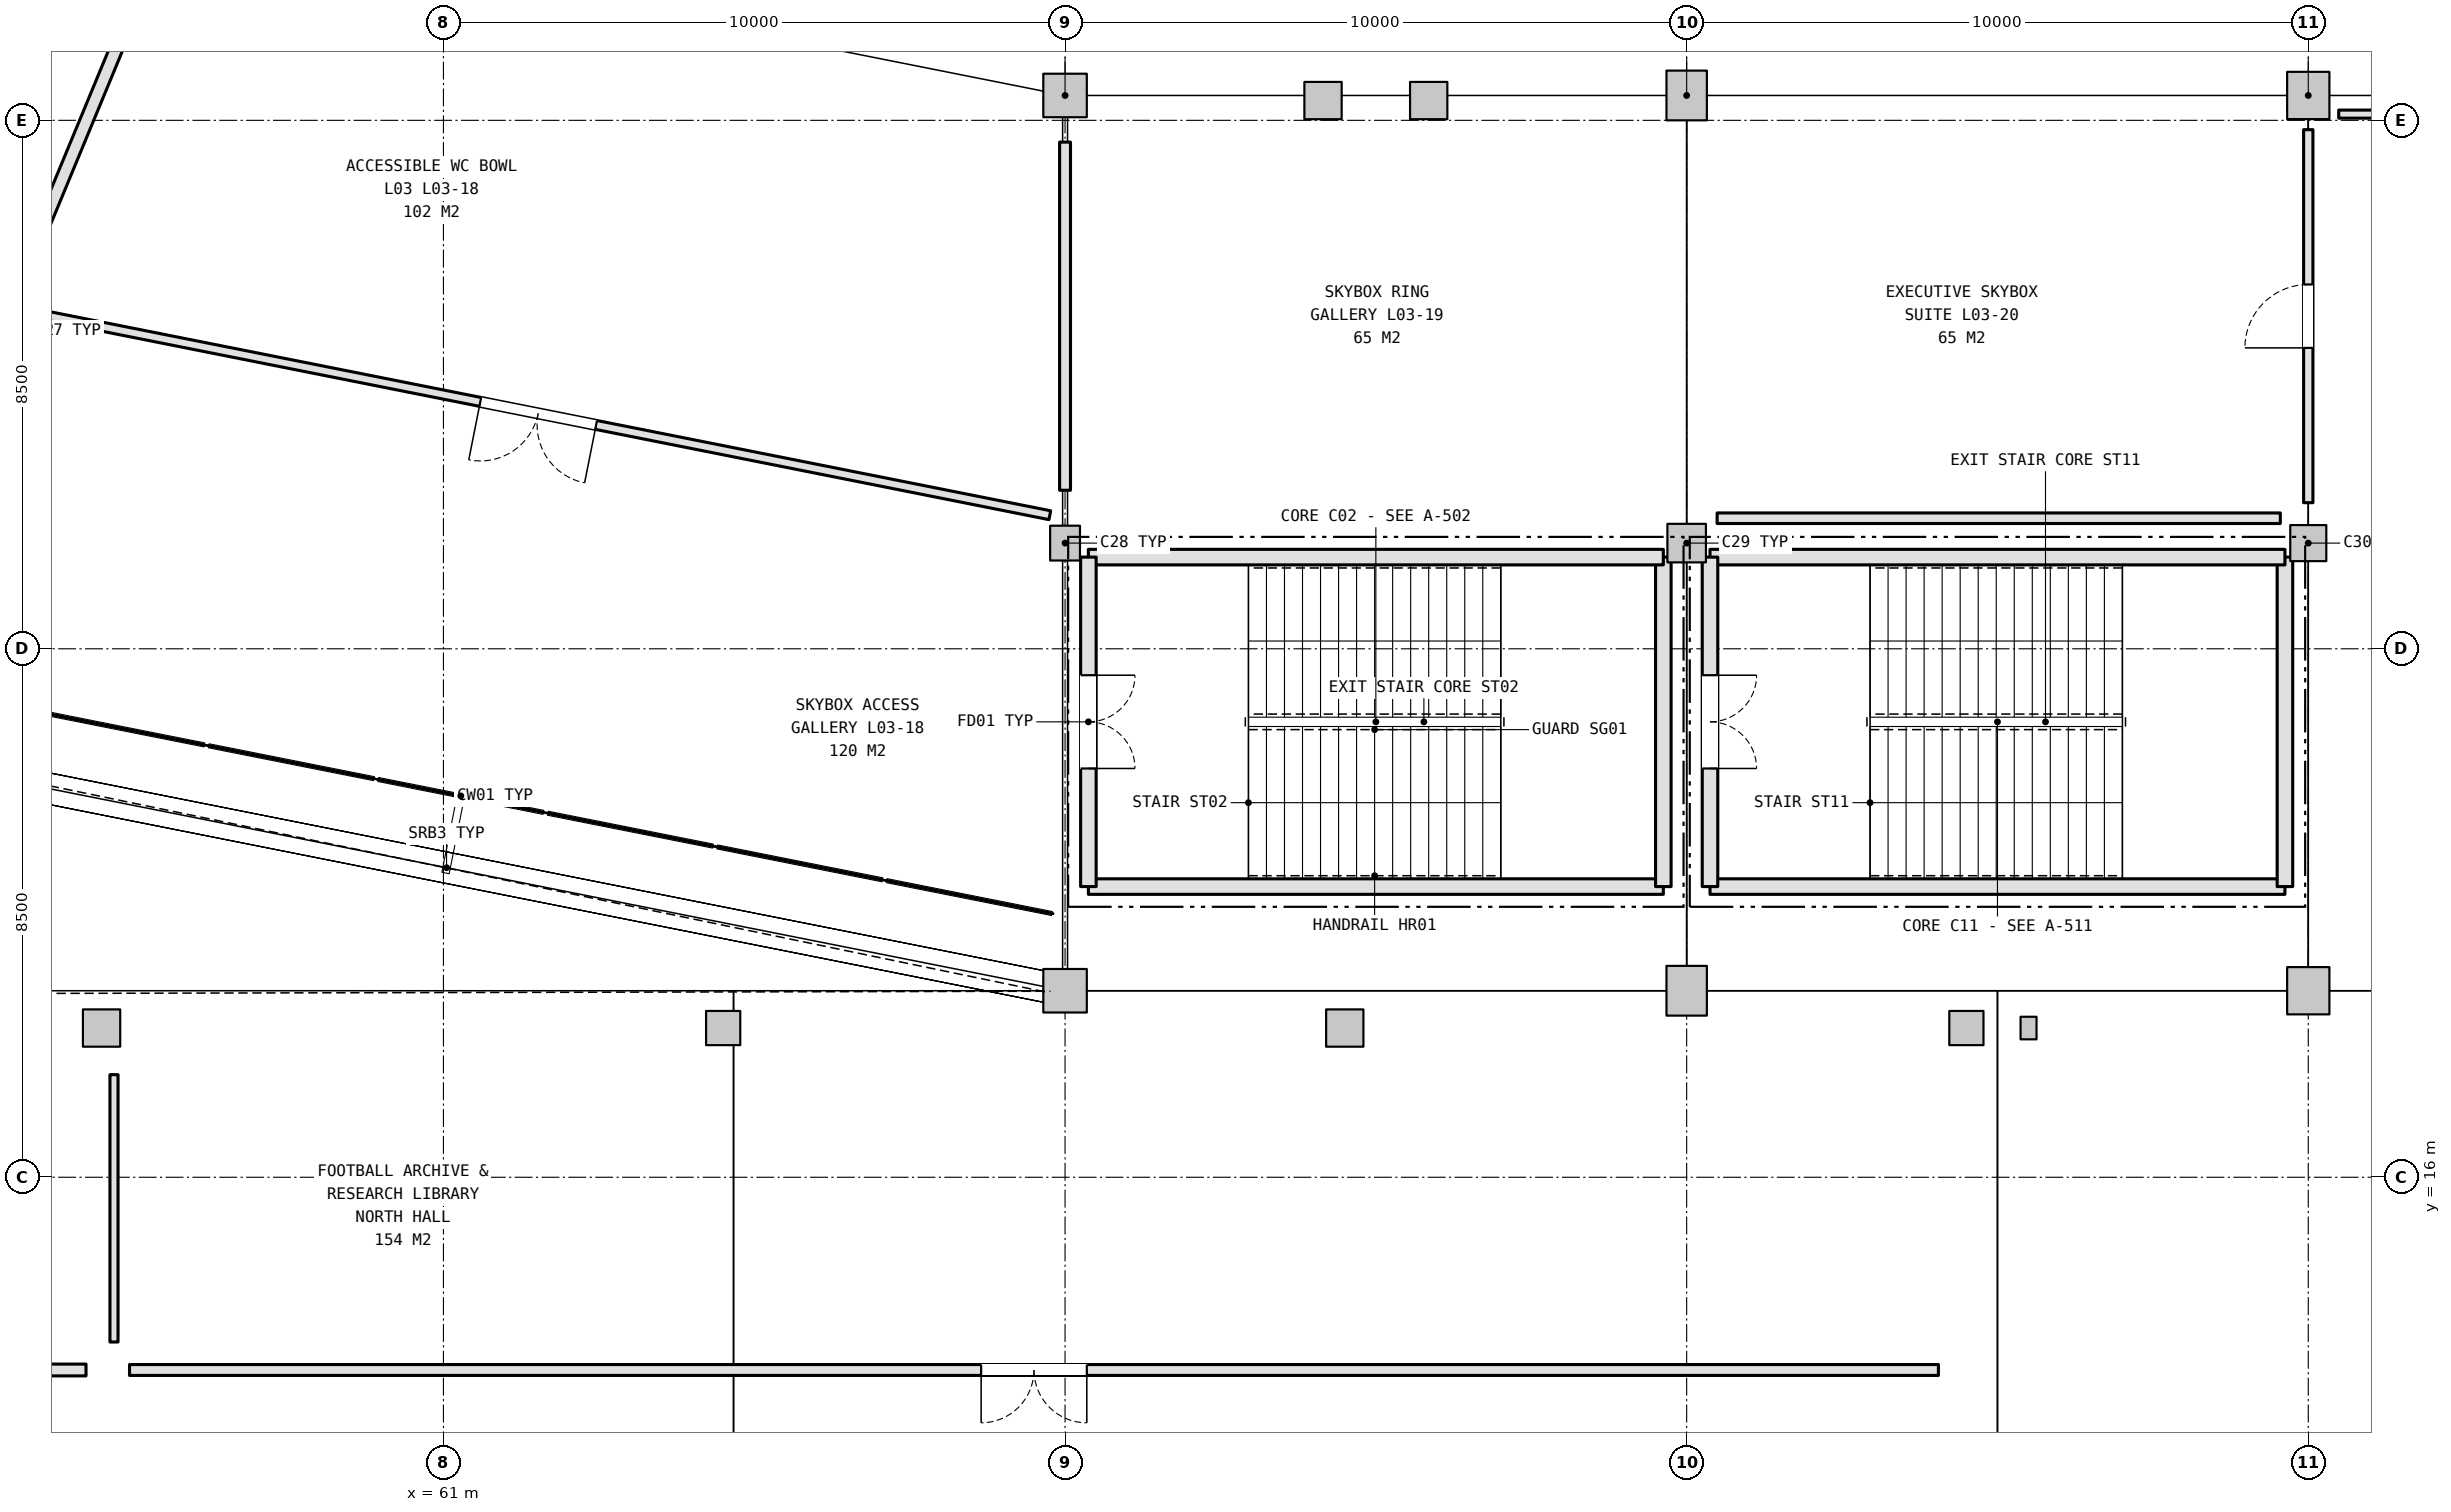
"""IFC4 building model, lengths in metres.
Left out: names, types, materials, properties, quantities, classifications, styles, units other than length and angle.
Written with IfcOpenShell. Run it as: python <this file> out.ifc"""

import sys

from ifc_helpers import new_model, si_unit, direction, frame, frame_2d, origin, origin_2d, place, context, subcontext, project, spatial, rectangle, i_section, extrude, element, fill, save


model = new_model("IFC4")
c1 = context("Model", 3, precision=1e-05, world=origin(), true_north=direction((0.0, 1.0)))
c2 = subcontext(c1, "Body", "Model", "MODEL_VIEW")
j1 = project(units=[si_unit("LENGTHUNIT", "METRE"), si_unit("PLANEANGLEUNIT", "RADIAN")], contexts=[c1])
p1 = place(None, origin())
s1 = spatial("IfcSite", under=j1, at=p1, CompositionType="ELEMENT")
p2 = place(p1, origin())
s2 = spatial("IfcBuilding", under=s1, at=p2, CompositionType="ELEMENT")
p3 = place(p2, frame((0.0, 0.0, 16.2)))
s3 = spatial("IfcBuildingStorey", under=s2, at=p3, CompositionType="ELEMENT", Elevation=16.2)
p4 = place(p3, frame((71.0, 33.4, 0.0), z_axis=(0.0, 0.0, 1.0), x_axis=(1.0, 0.0, 0.0)))
e1 = element("IfcColumn", 1, at=p4, inside=s3, PredefinedType="COLUMN", context=c2, shape_type="SweptSolid", body=[
    extrude(rectangle(XDim=0.7, YDim=0.7, at=origin_2d()), origin(), (0.0, 0.0, 1.0), 5.4),
])
p5 = place(p3, frame((71.0, 26.2, 0.0), z_axis=(0.0, 0.0, 1.0), x_axis=(1.0, 0.0, 0.0)))
e2 = element("IfcColumn", 2, at=p5, inside=s3, PredefinedType="COLUMN", context=c2, shape_type="SweptSolid", body=[
    extrude(rectangle(XDim=0.48, YDim=0.56, at=origin_2d()), origin(), (0.0, 0.0, 1.0), 5.4),
])
p6 = place(p3, frame((71.0, 19.0, 0.0), z_axis=(0.0, 0.0, 1.0), x_axis=(1.0, 0.0, 0.0)))
e3 = element("IfcColumn", 3, at=p6, inside=s3, PredefinedType="COLUMN", context=c2, shape_type="SweptSolid", body=[
    extrude(rectangle(XDim=0.7, YDim=0.7, at=origin_2d()), origin(), (0.0, 0.0, 1.0), 5.4),
])
p7 = place(p3, frame((81.0, 33.4, 0.0), z_axis=(0.0, 0.0, 1.0), x_axis=(1.0, 0.0, 0.0)))
e4 = element("IfcColumn", 4, at=p7, inside=s3, PredefinedType="COLUMN", context=c2, shape_type="SweptSolid", body=[
    extrude(rectangle(XDim=0.65, YDim=0.8, at=origin_2d()), origin(), (0.0, 0.0, 1.0), 5.4),
])
p8 = place(p3, frame((81.0, 26.2, 0.0), z_axis=(0.0, 0.0, 1.0), x_axis=(1.0, 0.0, 0.0)))
e5 = element("IfcColumn", 5, at=p8, inside=s3, PredefinedType="COLUMN", context=c2, shape_type="SweptSolid", body=[
    extrude(rectangle(XDim=0.62, YDim=0.62, at=origin_2d()), origin(), (0.0, 0.0, 1.0), 5.4),
])
p9 = place(p3, frame((81.0, 19.0, 0.0), z_axis=(0.0, 0.0, 1.0), x_axis=(1.0, 0.0, 0.0)))
e6 = element("IfcColumn", 6, at=p9, inside=s3, PredefinedType="COLUMN", context=c2, shape_type="SweptSolid", body=[
    extrude(rectangle(XDim=0.65, YDim=0.8, at=origin_2d()), origin(), (0.0, 0.0, 1.0), 5.4),
])
p10 = place(p3, frame((91.0, 33.4, 0.0), z_axis=(0.0, 0.0, 1.0), x_axis=(1.0, 0.0, 0.0)))
e7 = element("IfcColumn", 7, at=p10, inside=s3, PredefinedType="COLUMN", context=c2, shape_type="SweptSolid", body=[
    extrude(rectangle(XDim=0.68, YDim=0.76, at=origin_2d()), origin(), (0.0, 0.0, 1.0), 5.4),
])
p11 = place(p3, frame((91.0, 26.2, 0.0), z_axis=(0.0, 0.0, 1.0), x_axis=(1.0, 0.0, 0.0)))
e8 = element("IfcColumn", 8, at=p11, inside=s3, PredefinedType="COLUMN", context=c2, shape_type="SweptSolid", body=[
    extrude(rectangle(XDim=0.58, YDim=0.58, at=origin_2d()), origin(), (0.0, 0.0, 1.0), 5.4),
])
p12 = place(p3, frame((91.0, 19.0, 0.0), z_axis=(0.0, 0.0, 1.0), x_axis=(1.0, 0.0, 0.0)))
e9 = element("IfcColumn", 9, at=p12, inside=s3, PredefinedType="COLUMN", context=c2, shape_type="SweptSolid", body=[
    extrude(rectangle(XDim=0.68, YDim=0.76, at=origin_2d()), origin(), (0.0, 0.0, 1.0), 5.4),
])
p13 = place(p3, frame((55.5, 18.4, 0.0), z_axis=(0.0, 0.0, 1.0), x_axis=(1.0, 0.0, 0.0)))
e10 = element("IfcColumn", 10, at=p13, inside=s3, PredefinedType="COLUMN", context=c2, shape_type="SweptSolid", body=[
    extrude(rectangle(XDim=0.6, YDim=0.6, at=origin_2d()), origin(), (0.0, 0.0, 1.0), 5.4),
])
p14 = place(p3, frame((65.5, 18.4, 0.0), z_axis=(0.0, 0.0, 1.0), x_axis=(1.0, 0.0, 0.0)))
e11 = element("IfcColumn", 11, at=p14, inside=s3, PredefinedType="COLUMN", context=c2, shape_type="SweptSolid", body=[
    extrude(rectangle(XDim=0.55, YDim=0.55, at=origin_2d()), origin(), (0.0, 0.0, 1.0), 5.4),
])
p15 = place(p3, frame((75.5, 18.4, 0.0), z_axis=(0.0, 0.0, 1.0), x_axis=(1.0, 0.0, 0.0)))
e12 = element("IfcColumn", 12, at=p15, inside=s3, PredefinedType="COLUMN", context=c2, shape_type="SweptSolid", body=[
    extrude(rectangle(XDim=0.6, YDim=0.6, at=origin_2d()), origin(), (0.0, 0.0, 1.0), 5.4),
])
p16 = place(p3, frame((85.5, 18.4, 0.0), z_axis=(0.0, 0.0, 1.0), x_axis=(1.0, 0.0, 0.0)))
e13 = element("IfcColumn", 13, at=p16, inside=s3, PredefinedType="COLUMN", context=c2, shape_type="SweptSolid", body=[
    extrude(rectangle(XDim=0.55, YDim=0.55, at=origin_2d()), origin(), (0.0, 0.0, 1.0), 5.4),
])
p17 = place(p3, frame((86.5, 18.4, 0.0), z_axis=(0.0, 0.0, 1.0), x_axis=(1.0, 0.0, 0.0)))
e14 = element("IfcColumn", 14, at=p17, inside=s3, PredefinedType="COLUMN", context=c2, shape_type="SweptSolid", body=[
    extrude(i_section(OverallWidth=0.257, OverallDepth=0.363, WebThickness=0.013, FlangeThickness=0.022, FilletRadius=0.015, at=origin_2d()), origin(), (0.0, 0.0, 1.0), 5.4),
])
p18 = place(p3, frame((71.375, 20.675, 0.0), z_axis=(0.0, 0.0, 1.0), x_axis=(1.0, 0.0, 0.0)))
e15 = element("IfcWall", 15, at=p18, inside=s3, PredefinedType="SHEAR", context=c2, shape_type="SweptSolid", body=[
    extrude(rectangle(XDim=9.249, YDim=0.25, at=frame_2d((4.625, 0.0))), origin(), (0.0, 0.0, 1.0), 5.14),
])
p19 = place(p3, frame((80.625, 20.675, 0.0), z_axis=(0.0, 0.0, 1.0), x_axis=(0.0, 1.0, 0.0)))
e16 = element("IfcWall", 16, at=p19, inside=s3, PredefinedType="SHEAR", context=c2, shape_type="SweptSolid", body=[
    extrude(rectangle(XDim=5.299, YDim=0.25, at=frame_2d((2.65, 0.0))), origin(), (0.0, 0.0, 1.0), 5.14),
])
p20 = place(p3, frame((80.625, 25.975, 0.0), z_axis=(0.0, 0.0, 1.0), x_axis=(-1.0, 0.0, 0.0)))
e17 = element("IfcWall", 17, at=p20, inside=s3, PredefinedType="SHEAR", context=c2, shape_type="SweptSolid", body=[
    extrude(rectangle(XDim=9.249, YDim=0.25, at=frame_2d((4.625, 0.0))), origin(), (0.0, 0.0, 1.0), 5.14),
])
p21 = place(p3, frame((71.375, 25.975, 0.0), z_axis=(0.0, 0.0, 1.0), x_axis=(0.0, -1.0, 0.0)))
e18 = element("IfcWall", 18, at=p21, inside=s3, PredefinedType="SHEAR", context=c2, shape_type="SweptSolid", body=[
    extrude(rectangle(XDim=5.299, YDim=0.25, at=frame_2d((2.65, 0.0))), origin(), (0.0, 0.0, 1.0), 5.14),
])
p22 = place(p21, frame((1.9, 0.0, 0.0)))
e19 = element("IfcOpeningElement", 19, at=p22, cuts=e18, PredefinedType="OPENING", context=c2, shape_type="SweptSolid", body=[
    extrude(rectangle(XDim=1.5, YDim=2.2, at=frame_2d((0.75, 1.1))), frame((0.0, 0.135, 0.0), z_axis=(0.0, -1.0, 0.0), x_axis=(1.0, 0.0, 0.0)), (0.0, 0.0, 1.0), 0.27),
])
p23 = place(p3, frame((81.375, 20.675, 0.0), z_axis=(0.0, 0.0, 1.0), x_axis=(1.0, 0.0, 0.0)))
e20 = element("IfcWall", 20, at=p23, inside=s3, PredefinedType="SHEAR", context=c2, shape_type="SweptSolid", body=[
    extrude(rectangle(XDim=9.249, YDim=0.25, at=frame_2d((4.625, 0.0))), origin(), (0.0, 0.0, 1.0), 5.14),
])
p24 = place(p3, frame((90.625, 20.675, 0.0), z_axis=(0.0, 0.0, 1.0), x_axis=(0.0, 1.0, 0.0)))
e21 = element("IfcWall", 21, at=p24, inside=s3, PredefinedType="SHEAR", context=c2, shape_type="SweptSolid", body=[
    extrude(rectangle(XDim=5.299, YDim=0.25, at=frame_2d((2.65, 0.0))), origin(), (0.0, 0.0, 1.0), 5.14),
])
p25 = place(p3, frame((90.625, 25.975, 0.0), z_axis=(0.0, 0.0, 1.0), x_axis=(-1.0, 0.0, 0.0)))
e22 = element("IfcWall", 22, at=p25, inside=s3, PredefinedType="SHEAR", context=c2, shape_type="SweptSolid", body=[
    extrude(rectangle(XDim=9.249, YDim=0.25, at=frame_2d((4.625, 0.0))), origin(), (0.0, 0.0, 1.0), 5.14),
])
p26 = place(p3, frame((81.375, 25.975, 0.0), z_axis=(0.0, 0.0, 1.0), x_axis=(0.0, -1.0, 0.0)))
e23 = element("IfcWall", 23, at=p26, inside=s3, PredefinedType="SHEAR", context=c2, shape_type="SweptSolid", body=[
    extrude(rectangle(XDim=5.299, YDim=0.25, at=frame_2d((2.65, 0.0))), origin(), (0.0, 0.0, 1.0), 5.14),
])
p27 = place(p26, frame((1.9, 0.0, 0.0)))
e24 = element("IfcOpeningElement", 24, at=p27, cuts=e23, PredefinedType="OPENING", context=c2, shape_type="SweptSolid", body=[
    extrude(rectangle(XDim=1.5, YDim=2.2, at=frame_2d((0.75, 1.1))), frame((0.0, 0.135, 0.0), z_axis=(0.0, -1.0, 0.0), x_axis=(1.0, 0.0, 0.0)), (0.0, 0.0, 1.0), 0.27),
])
for number, where, z_axis, x_axis in (
    (25, (76.85, 33.318, 0.0), (0.0, 0.0, 1.0), (1.0, 0.0, 0.0)),
    (26, (75.15, 33.318, 0.0), (0.0, 0.0, 1.0), (1.0, 0.0, 0.0)),
):
    element("IfcColumn", number, at=place(p3, frame(where, z_axis=z_axis, x_axis=x_axis)), inside=s3, PredefinedType="COLUMN", context=c2, shape_type="SweptSolid", body=[
        extrude(rectangle(XDim=0.6, YDim=0.6, at=origin_2d()), origin(), (0.0, 0.0, 1.0), 5.4),
    ])
p28 = place(p3, frame((55.25, 12.9, 0.0), z_axis=(0.0, 0.0, 1.0), x_axis=(-1.0, 0.0, 0.0)))
e27 = element("IfcWall", 27, at=p28, inside=s3, PredefinedType="PARTITIONING", context=c2, shape_type="SweptSolid", body=[
    extrude(rectangle(XDim=29.3, YDim=0.19, at=frame_2d((14.65, 0.0))), origin(), (0.0, 0.0, 1.0), 4.405),
])
p29 = place(p28, frame((14.175, 0.0, 0.0)))
e28 = element("IfcOpeningElement", 28, at=p29, cuts=e27, PredefinedType="OPENING", context=c2, shape_type="SweptSolid", body=[
    extrude(rectangle(XDim=0.95, YDim=2.15, at=frame_2d((0.475, 1.075))), frame((0.0, 0.105, 0.0), z_axis=(0.0, -1.0, 0.0), x_axis=(1.0, 0.0, 0.0)), (0.0, 0.0, 1.0), 0.21),
])
p30 = place(p3, frame((85.05, 12.9, 0.0), z_axis=(0.0, 0.0, 1.0), x_axis=(-1.0, 0.0, 0.0)))
e29 = element("IfcWall", 29, at=p30, inside=s3, PredefinedType="PARTITIONING", context=c2, shape_type="SweptSolid", body=[
    extrude(rectangle(XDim=29.1, YDim=0.175, at=frame_2d((14.55, 0.0))), origin(), (0.0, 0.0, 1.0), 4.405),
])
p31 = place(p30, frame((13.7, 0.0, 0.0)))
e30 = element("IfcOpeningElement", 30, at=p31, cuts=e29, PredefinedType="OPENING", context=c2, shape_type="SweptSolid", body=[
    extrude(rectangle(XDim=1.7, YDim=2.25, at=frame_2d((0.85, 1.125))), frame((0.0, 0.097, 0.0), z_axis=(0.0, -1.0, 0.0), x_axis=(1.0, 0.0, 0.0)), (0.0, 0.0, 1.0), 0.195),
])
p32 = place(p3, frame((55.7, 13.35, 0.0), z_axis=(0.0, 0.0, 1.0), x_axis=(0.0, 1.0, 0.0)))
e31 = element("IfcWall", 31, at=p32, inside=s3, PredefinedType="PARTITIONING", context=c2, shape_type="SweptSolid", body=[
    extrude(rectangle(XDim=4.3, YDim=0.13, at=frame_2d((2.15, 0.0))), origin(), (0.0, 0.0, 1.0), 4.405),
])
p33 = place(p3, frame((56.324, 35.569, 0.0), z_axis=(0.0, 0.0, 1.0), x_axis=(-0.382682918336, -0.923879745429, 0.0)))
e32 = element("IfcWall", 32, at=p33, inside=s3, PredefinedType="PLUMBINGWALL", context=c2, shape_type="SweptSolid", body=[
    extrude(rectangle(XDim=5.6, YDim=0.21, at=frame_2d((2.8, 0.0))), origin(), (0.0, 0.0, 1.0), 4.375),
])
p34 = place(p3, frame((70.755, 26.649, 0.0), z_axis=(0.0, 0.0, 1.0), x_axis=(-0.980783244425, 0.195100557291, 0.0)))
e33 = element("IfcWall", 33, at=p34, inside=s3, PredefinedType="PARTITIONING", context=c2, shape_type="SweptSolid", body=[
    extrude(rectangle(XDim=16.783, YDim=0.145, at=frame_2d((8.392, 0.0))), origin(), (0.0, 0.0, 1.0), 4.375),
])
p35 = place(p34, frame((7.442, 0.0, 0.0)))
e34 = element("IfcOpeningElement", 34, at=p35, cuts=e33, PredefinedType="OPENING", context=c2, shape_type="SweptSolid", body=[
    extrude(rectangle(XDim=1.9, YDim=2.3, at=frame_2d((0.95, 1.15))), frame((0.0, 0.083, 0.0), z_axis=(0.0, -1.0, 0.0), x_axis=(1.0, 0.0, 0.0)), (0.0, 0.0, 1.0), 0.165),
])
p36 = place(p3, frame((71.0, 32.65, 0.0), z_axis=(0.0, 0.0, 1.0), x_axis=(0.0, -1.0, 0.0)))
e35 = element("IfcWall", 35, at=p36, inside=s3, PredefinedType="PARTITIONING", context=c2, shape_type="SweptSolid", body=[
    extrude(rectangle(XDim=5.6, YDim=0.175, at=frame_2d((2.8, 0.0))), origin(), (0.0, 0.0, 1.0), 4.365),
])
p37 = place(p3, frame((91.0, 32.85, 0.0), z_axis=(0.0, 0.0, 1.0), x_axis=(0.0, -1.0, 0.0)))
e36 = element("IfcWall", 36, at=p37, inside=s3, PredefinedType="PARTITIONING", context=c2, shape_type="SweptSolid", body=[
    extrude(rectangle(XDim=6.0, YDim=0.15, at=frame_2d((3.0, 0.0))), origin(), (0.0, 0.0, 1.0), 4.305),
])
p38 = place(p37, frame((2.49, 0.0, 0.0)))
e37 = element("IfcOpeningElement", 37, at=p38, cuts=e36, PredefinedType="OPENING", context=c2, shape_type="SweptSolid", body=[
    extrude(rectangle(XDim=1.02, YDim=2.15, at=frame_2d((0.51, 1.075))), frame((0.0, 0.085, 0.0), z_axis=(0.0, -1.0, 0.0), x_axis=(1.0, 0.0, 0.0)), (0.0, 0.0, 1.0), 0.17),
])
p39 = place(p3, frame((90.55, 26.6, 0.0), z_axis=(0.0, 0.0, 1.0), x_axis=(-1.0, 0.0, 0.0)))
e38 = element("IfcWall", 38, at=p39, inside=s3, PredefinedType="PARTITIONING", context=c2, shape_type="SweptSolid", body=[
    extrude(rectangle(XDim=9.06, YDim=0.17, at=frame_2d((4.53, 0.0))), origin(), (0.0, 0.0, 1.0), 5.12),
])
p40 = place(p3, frame((91.49, 33.1, 0.0), z_axis=(0.0, 0.0, 1.0), x_axis=(1.0, 0.0, 0.0)))
e39 = element("IfcWall", 39, at=p40, inside=s3, PredefinedType="PARTITIONING", context=c2, shape_type="SweptSolid", body=[
    extrude(rectangle(XDim=9.06, YDim=0.13, at=frame_2d((4.53, 0.0))), origin(), (0.0, 0.0, 1.0), 4.505),
])
p41 = place(p22, origin())
e40 = element("IfcDoor", 40, at=p41, inside=s3, OperationType="DOUBLE_DOOR_SINGLE_SWING", PredefinedType="DOOR", context=c2, shape_type="SweptSolid", body=[
    extrude(rectangle(XDim=1.5, YDim=2.2, at=frame_2d((0.75, 1.1))), frame((0.0, 0.025, 0.0), z_axis=(0.0, -1.0, 0.0), x_axis=(1.0, 0.0, 0.0)), (0.0, 0.0, 1.0), 0.05),
])
fill(e19, e40)
p42 = place(p27, origin())
e41 = element("IfcDoor", 41, at=p42, inside=s3, OperationType="DOUBLE_DOOR_SINGLE_SWING", PredefinedType="DOOR", context=c2, shape_type="SweptSolid", body=[
    extrude(rectangle(XDim=1.5, YDim=2.2, at=frame_2d((0.75, 1.1))), frame((0.0, 0.025, 0.0), z_axis=(0.0, -1.0, 0.0), x_axis=(1.0, 0.0, 0.0)), (0.0, 0.0, 1.0), 0.05),
])
fill(e24, e41)
p43 = place(p31, origin())
e42 = element("IfcDoor", 42, at=p43, inside=s3, OperationType="DOUBLE_DOOR_SINGLE_SWING", PredefinedType="DOOR", context=c2, shape_type="SweptSolid", body=[
    extrude(rectangle(XDim=1.7, YDim=2.25, at=frame_2d((0.85, 1.125))), frame((0.0, 0.025, 0.0), z_axis=(0.0, -1.0, 0.0), x_axis=(1.0, 0.0, 0.0)), (0.0, 0.0, 1.0), 0.05),
])
fill(e30, e42)
p44 = place(p35, origin())
e43 = element("IfcDoor", 43, at=p44, inside=s3, OperationType="DOUBLE_DOOR_SINGLE_SWING", PredefinedType="DOOR", context=c2, shape_type="SweptSolid", body=[
    extrude(rectangle(XDim=1.9, YDim=2.3, at=frame_2d((0.95, 1.15))), frame((0.0, 0.025, 0.0), z_axis=(0.0, -1.0, 0.0), x_axis=(1.0, 0.0, 0.0)), (0.0, 0.0, 1.0), 0.05),
])
fill(e34, e43)
p45 = place(p38, frame((1.02, 0.0, 0.0), z_axis=(0.0, 0.0, 1.0), x_axis=(-1.0, 0.0, 0.0)))
e44 = element("IfcDoor", 44, at=p45, inside=s3, OperationType="SINGLE_SWING_RIGHT", PredefinedType="DOOR", context=c2, shape_type="SweptSolid", body=[
    extrude(rectangle(XDim=1.02, YDim=2.15, at=frame_2d((0.51, 1.075))), frame((0.0, 0.025, 0.0), z_axis=(0.0, -1.0, 0.0), x_axis=(1.0, 0.0, 0.0)), (0.0, 0.0, 1.0), 0.05),
])
fill(e37, e44)
save(model, sys.argv[1])
